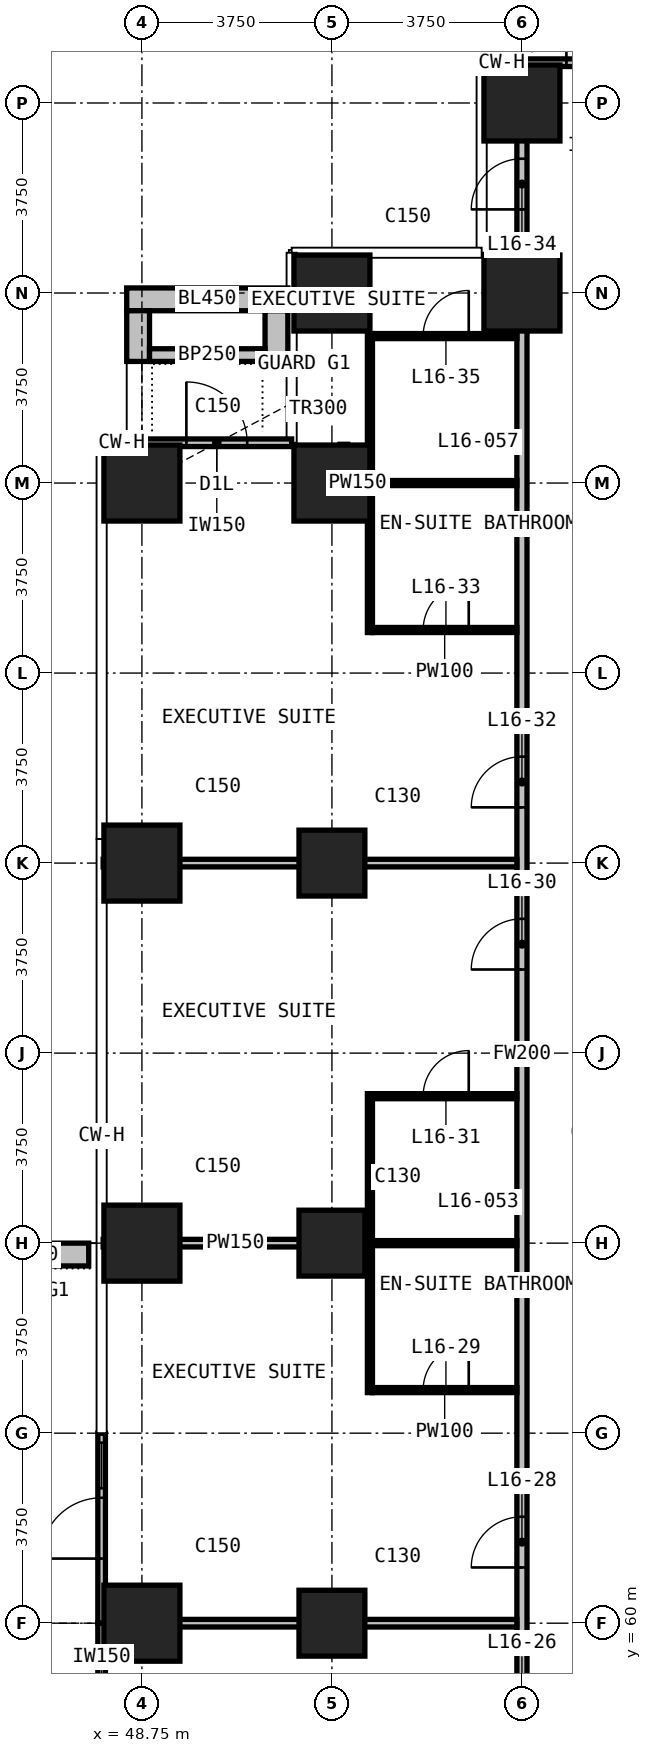
"""IFC4 building model, lengths in metres.
Left out: names, types, materials, properties, quantities, classifications, styles, units other than length and angle.
Written with IfcOpenShell. Run it as: python <this file> out.ifc"""

import sys

from ifc_helpers import new_model, si_unit, direction, frame, frame_2d, origin, origin_2d, place, context, subcontext, project, spatial, rectangle, extrude, element, fill, save


model = new_model("IFC4")
c1 = context("Model", 3, precision=1e-05, world=origin(), true_north=direction((0.0, 1.0)))
c2 = subcontext(c1, "Body", "Model", "MODEL_VIEW")
j1 = project(units=[si_unit("LENGTHUNIT", "METRE"), si_unit("PLANEANGLEUNIT", "RADIAN")], contexts=[c1])
p1 = place(None, origin())
s1 = spatial("IfcSite", under=j1, at=p1, CompositionType="ELEMENT")
p2 = place(p1, origin())
s2 = spatial("IfcBuilding", under=s1, at=p2, CompositionType="ELEMENT")
p3 = place(p2, frame((0.0, 0.0, 72.5)))
s3 = spatial("IfcBuildingStorey", under=s2, at=p3, CompositionType="ELEMENT", Elevation=72.5)
for number, where, z_axis, x_axis in (
    (1, (48.75, 60.0, 0.0), (0.0, 0.0, 1.0), (1.0, 0.0, 0.0)),
    (2, (48.75, 67.5, 0.0), (0.0, 0.0, 1.0), (1.0, 0.0, 0.0)),
    (3, (48.75, 75.0, 0.0), (0.0, 0.0, 1.0), (1.0, 0.0, 0.0)),
    (4, (48.75, 82.5, 0.0), (0.0, 0.0, 1.0), (1.0, 0.0, 0.0)),
):
    element("IfcColumn", number, at=place(p3, frame(where, z_axis=z_axis, x_axis=x_axis)), inside=s3, PredefinedType="COLUMN", context=c2, shape_type="SweptSolid", body=[
        extrude(rectangle(XDim=1.5, YDim=1.5, at=origin_2d()), origin(), (0.0, 0.0, 1.0), 3.3),
    ])
for number, where, z_axis, x_axis in (
    (5, (52.5, 60.0, 0.0), (0.0, 0.0, 1.0), (1.0, 0.0, 0.0)),
    (6, (52.5, 67.5, 0.0), (0.0, 0.0, 1.0), (1.0, 0.0, 0.0)),
    (7, (52.5, 75.0, 0.0), (0.0, 0.0, 1.0), (1.0, 0.0, 0.0)),
):
    element("IfcColumn", number, at=place(p3, frame(where, z_axis=z_axis, x_axis=x_axis)), inside=s3, PredefinedType="COLUMN", context=c2, shape_type="SweptSolid", body=[
        extrude(rectangle(XDim=1.3, YDim=1.3, at=origin_2d()), origin(), (0.0, 0.0, 1.0), 3.3),
    ])
for number, where, z_axis, x_axis in (
    (8, (52.5, 82.5, 0.0), (0.0, 0.0, 1.0), (1.0, 0.0, 0.0)),
    (9, (52.5, 86.25, 0.0), (0.0, 0.0, 1.0), (1.0, 0.0, 0.0)),
    (10, (56.25, 86.25, 0.0), (0.0, 0.0, 1.0), (1.0, 0.0, 0.0)),
    (11, (56.25, 90.0, 0.0), (0.0, 0.0, 1.0), (1.0, 0.0, 0.0)),
):
    element("IfcColumn", number, at=place(p3, frame(where, z_axis=z_axis, x_axis=x_axis)), inside=s3, PredefinedType="COLUMN", context=c2, shape_type="SweptSolid", body=[
        extrude(rectangle(XDim=1.5, YDim=1.5, at=origin_2d()), origin(), (0.0, 0.0, 1.0), 3.3),
    ])
p4 = place(p3, frame((56.25, 90.795, 0.0), z_axis=(0.0, 0.0, 1.0), x_axis=(1.0, 0.0, 0.0)))
e12 = element("IfcWall", 12, at=p4, inside=s3, PredefinedType="SOLIDWALL", context=c2, shape_type="SweptSolid", body=[
    extrude(rectangle(XDim=2.955, YDim=0.15, at=frame_2d((1.478, 0.0))), origin(), (0.0, 0.0, 1.0), 3.0),
])
p5 = place(p4, frame((0.877, 0.0, 0.0)))
e13 = element("IfcOpeningElement", 13, at=p5, cuts=e12, PredefinedType="OPENING", context=c2, shape_type="SweptSolid", body=[
    extrude(rectangle(XDim=1.2, YDim=2.4, at=frame_2d((0.6, 1.2))), frame((0.0, 0.085, 0.0), z_axis=(0.0, -1.0, 0.0), x_axis=(1.0, 0.0, 0.0)), (0.0, 0.0, 1.0), 0.17),
])
p6 = place(p3, frame((48.75, 83.295, 0.0), z_axis=(0.0, 0.0, 1.0), x_axis=(1.0, 0.0, 0.0)))
e14 = element("IfcWall", 14, at=p6, inside=s3, PredefinedType="SOLIDWALL", context=c2, shape_type="SweptSolid", body=[
    extrude(rectangle(XDim=2.955, YDim=0.15, at=frame_2d((1.478, 0.0))), origin(), (0.0, 0.0, 1.0), 3.0),
])
p7 = place(p6, frame((0.877, 0.0, 0.0)))
e15 = element("IfcOpeningElement", 15, at=p7, cuts=e14, PredefinedType="OPENING", context=c2, shape_type="SweptSolid", body=[
    extrude(rectangle(XDim=1.2, YDim=2.0, at=frame_2d((0.6, 1.0))), frame((0.0, 0.085, 0.0), z_axis=(0.0, -1.0, 0.0), x_axis=(1.0, 0.0, 0.0)), (0.0, 0.0, 1.0), 0.17),
])
p8 = place(p3, frame((47.955, 56.25, 0.0), z_axis=(0.0, 0.0, 1.0), x_axis=(0.0, 1.0, 0.0)))
e16 = element("IfcWall", 16, at=p8, inside=s3, PredefinedType="SOLIDWALL", context=c2, shape_type="SweptSolid", body=[
    extrude(rectangle(XDim=3.75, YDim=0.15, at=frame_2d((1.875, 0.0))), origin(), (0.0, 0.0, 1.0), 3.0),
])
p9 = place(p8, frame((0.188, 0.0, 0.1)))
e17 = element("IfcOpeningElement", 17, at=p9, cuts=e16, PredefinedType="OPENING", context=c2, shape_type="SweptSolid", body=[
    extrude(rectangle(XDim=0.9, YDim=2.4, at=frame_2d((0.45, 1.2))), frame((0.0, 0.085, 0.0), z_axis=(0.0, -1.0, 0.0), x_axis=(1.0, 0.0, 0.0)), (0.0, 0.0, 1.0), 0.17),
])
p10 = place(p8, frame((1.275, 0.0, 0.0)))
e18 = element("IfcOpeningElement", 18, at=p10, cuts=e16, PredefinedType="OPENING", context=c2, shape_type="SweptSolid", body=[
    extrude(rectangle(XDim=1.2, YDim=2.4, at=frame_2d((0.6, 1.2))), frame((0.0, 0.085, 0.0), z_axis=(0.0, -1.0, 0.0), x_axis=(1.0, 0.0, 0.0)), (0.0, 0.0, 1.0), 0.17),
])
p11 = place(p3, frame((47.955, 60.0, 0.0), z_axis=(0.0, 0.0, 1.0), x_axis=(0.0, 1.0, 0.0)))
e19 = element("IfcWall", 19, at=p11, inside=s3, PredefinedType="SOLIDWALL", context=c2, shape_type="SweptSolid", body=[
    extrude(rectangle(XDim=3.75, YDim=0.15, at=frame_2d((1.875, 0.0))), origin(), (0.0, 0.0, 1.0), 3.0),
])
p12 = place(p11, frame((1.275, 0.0, 0.0)))
e20 = element("IfcOpeningElement", 20, at=p12, cuts=e19, PredefinedType="OPENING", context=c2, shape_type="SweptSolid", body=[
    extrude(rectangle(XDim=1.2, YDim=2.4, at=frame_2d((0.6, 1.2))), frame((0.0, 0.085, 0.0), z_axis=(0.0, -1.0, 0.0), x_axis=(1.0, 0.0, 0.0)), (0.0, 0.0, 1.0), 0.17),
])
p13 = place(p11, frame((2.663, 0.0, 0.1)))
e21 = element("IfcOpeningElement", 21, at=p13, cuts=e19, PredefinedType="OPENING", context=c2, shape_type="SweptSolid", body=[
    extrude(rectangle(XDim=0.9, YDim=2.4, at=frame_2d((0.45, 1.2))), frame((0.0, 0.085, 0.0), z_axis=(0.0, -1.0, 0.0), x_axis=(1.0, 0.0, 0.0)), (0.0, 0.0, 1.0), 0.17),
])
p14 = place(p3, frame((48.45, 86.125, 0.0), z_axis=(0.0, 0.0, 1.0), x_axis=(1.0, 0.0, 0.0)))
e22 = element("IfcWall", 22, at=p14, inside=s3, PredefinedType="USERDEFINED", context=c2, shape_type="SweptSolid", body=[
    extrude(rectangle(XDim=3.18, YDim=0.45, at=frame_2d((1.59, 0.0))), origin(), (0.0, 0.0, 1.0), 1.1),
])
for number, where, z_axis, x_axis in (
    (23, (48.675, 84.9, 0.0), (0.0, 0.0, 1.0), (0.0, 1.0, 0.0)),
    (24, (51.405, 84.9, 0.0), (0.0, 0.0, 1.0), (0.0, 1.0, 0.0)),
):
    element("IfcWall", number, at=place(p3, frame(where, z_axis=z_axis, x_axis=x_axis)), inside=s3, PredefinedType="USERDEFINED", context=c2, shape_type="SweptSolid", body=[
        extrude(rectangle(XDim=1.0, YDim=0.45, at=frame_2d((0.5, 0.0))), origin(), (0.0, 0.0, 1.0), 1.1),
    ])
p15 = place(p3, frame((48.9, 85.025, 0.0), z_axis=(0.0, 0.0, 1.0), x_axis=(1.0, 0.0, 0.0)))
e25 = element("IfcWall", 25, at=p15, inside=s3, PredefinedType="USERDEFINED", context=c2, shape_type="SweptSolid", body=[
    extrude(rectangle(XDim=2.28, YDim=0.25, at=frame_2d((1.14, 0.0))), origin(), (0.0, 0.0, 1.0), 1.0),
])
p16 = place(p3, frame((47.7, 67.275, 0.0), z_axis=(0.0, 0.0, 1.0), x_axis=(-1.0, 0.0, 0.0)))
e26 = element("IfcWall", 26, at=p16, inside=s3, PredefinedType="USERDEFINED", context=c2, shape_type="SweptSolid", body=[
    extrude(rectangle(XDim=2.35, YDim=0.45, at=frame_2d((1.175, 0.0))), origin(), (0.0, 0.0, 1.0), 1.1),
])
p17 = place(p3, frame((56.25, 52.4, 0.0), z_axis=(0.0, 0.0, 1.0), x_axis=(0.0, 1.0, 0.0)))
e27 = element("IfcWall", 27, at=p17, inside=s3, PredefinedType="PARTITIONING", context=c2, shape_type="SweptSolid", body=[
    extrude(rectangle(XDim=37.675, YDim=0.2, at=frame_2d((18.837, 0.0))), origin(), (0.0, 0.0, 1.0), 3.0),
])
p18 = place(p17, frame((5.5, 0.0, 0.0)))
e28 = element("IfcOpeningElement", 28, at=p18, cuts=e27, PredefinedType="OPENING", context=c2, shape_type="SweptSolid", body=[
    extrude(rectangle(XDim=1.0, YDim=2.2, at=frame_2d((0.5, 1.1))), frame((0.0, 0.11, 0.0), z_axis=(0.0, -1.0, 0.0), x_axis=(1.0, 0.0, 0.0)), (0.0, 0.0, 1.0), 0.22),
])
p19 = place(p17, frame((8.7, 0.0, 0.0)))
e29 = element("IfcOpeningElement", 29, at=p19, cuts=e27, PredefinedType="OPENING", context=c2, shape_type="SweptSolid", body=[
    extrude(rectangle(XDim=1.0, YDim=2.2, at=frame_2d((0.5, 1.1))), frame((0.0, 0.11, 0.0), z_axis=(0.0, -1.0, 0.0), x_axis=(1.0, 0.0, 0.0)), (0.0, 0.0, 1.0), 0.22),
])
p20 = place(p17, frame((20.5, 0.0, 0.0)))
e30 = element("IfcOpeningElement", 30, at=p20, cuts=e27, PredefinedType="OPENING", context=c2, shape_type="SweptSolid", body=[
    extrude(rectangle(XDim=1.0, YDim=2.2, at=frame_2d((0.5, 1.1))), frame((0.0, 0.11, 0.0), z_axis=(0.0, -1.0, 0.0), x_axis=(1.0, 0.0, 0.0)), (0.0, 0.0, 1.0), 0.22),
])
p21 = place(p17, frame((23.7, 0.0, 0.0)))
e31 = element("IfcOpeningElement", 31, at=p21, cuts=e27, PredefinedType="OPENING", context=c2, shape_type="SweptSolid", body=[
    extrude(rectangle(XDim=1.0, YDim=2.2, at=frame_2d((0.5, 1.1))), frame((0.0, 0.11, 0.0), z_axis=(0.0, -1.0, 0.0), x_axis=(1.0, 0.0, 0.0)), (0.0, 0.0, 1.0), 0.22),
])
p22 = place(p17, frame((35.5, 0.0, 0.0)))
e32 = element("IfcOpeningElement", 32, at=p22, cuts=e27, PredefinedType="OPENING", context=c2, shape_type="SweptSolid", body=[
    extrude(rectangle(XDim=1.0, YDim=2.2, at=frame_2d((0.5, 1.1))), frame((0.0, 0.11, 0.0), z_axis=(0.0, -1.0, 0.0), x_axis=(1.0, 0.0, 0.0)), (0.0, 0.0, 1.0), 0.22),
])
p23 = place(p3, frame((56.25, 90.03, 0.0), z_axis=(0.0, 0.0, 1.0), x_axis=(0.0, 1.0, 0.0)))
e33 = element("IfcWall", 33, at=p23, inside=s3, PredefinedType="PARTITIONING", context=c2, shape_type="SweptSolid", body=[
    extrude(rectangle(XDim=0.615, YDim=0.2, at=frame_2d((0.308, 0.0))), origin(), (0.0, 0.0, 1.0), 3.0),
])
p24 = place(p3, frame((48.04, 60.0, 0.0), z_axis=(0.0, 0.0, 1.0), x_axis=(1.0, 0.0, 0.0)))
e34 = element("IfcWall", 34, at=p24, inside=s3, PredefinedType="PARTITIONING", context=c2, shape_type="SweptSolid", body=[
    extrude(rectangle(XDim=8.11, YDim=0.15, at=frame_2d((4.055, 0.0))), origin(), (0.0, 0.0, 1.0), 3.0),
])
p25 = place(p3, frame((47.985, 67.5, 0.0), z_axis=(0.0, 0.0, 1.0), x_axis=(1.0, 0.0, 0.0)))
e35 = element("IfcWall", 35, at=p25, inside=s3, PredefinedType="PARTITIONING", context=c2, shape_type="SweptSolid", body=[
    extrude(rectangle(XDim=5.215, YDim=0.15, at=frame_2d((2.607, 0.0))), origin(), (0.0, 0.0, 1.0), 3.0),
])
p26 = place(p3, frame((47.985, 75.0, 0.0), z_axis=(0.0, 0.0, 1.0), x_axis=(1.0, 0.0, 0.0)))
e36 = element("IfcWall", 36, at=p26, inside=s3, PredefinedType="PARTITIONING", context=c2, shape_type="SweptSolid", body=[
    extrude(rectangle(XDim=8.165, YDim=0.15, at=frame_2d((4.083, 0.0))), origin(), (0.0, 0.0, 1.0), 3.0),
])
p27 = place(p3, frame((52.81, 82.5, 0.0), z_axis=(0.0, 0.0, 1.0), x_axis=(1.0, 0.0, 0.0)))
e37 = element("IfcWall", 37, at=p27, inside=s3, PredefinedType="PARTITIONING", context=c2, shape_type="SweptSolid", body=[
    extrude(rectangle(XDim=0.39, YDim=0.15, at=frame_2d((0.195, 0.0))), origin(), (0.0, 0.0, 1.0), 3.0),
])
p28 = place(p3, frame((55.605, 90.0, 0.0), z_axis=(0.0, 0.0, 1.0), x_axis=(1.0, 0.0, 0.0)))
e38 = element("IfcWall", 38, at=p28, inside=s3, PredefinedType="PARTITIONING", context=c2, shape_type="SweptSolid", body=[
    extrude(rectangle(XDim=0.545, YDim=0.15, at=frame_2d((0.272, 0.0))), origin(), (0.0, 0.0, 1.0), 3.0),
])
p29 = place(p3, frame((52.735, 82.425, 0.0), z_axis=(0.0, 0.0, 1.0), x_axis=(0.0, 1.0, 0.0)))
e39 = element("IfcWall", 39, at=p29, inside=s3, PredefinedType="PARTITIONING", context=c2, shape_type="SweptSolid", body=[
    extrude(rectangle(XDim=0.84, YDim=0.15, at=frame_2d((0.42, 0.0))), origin(), (0.0, 0.0, 1.0), 3.0),
])
p30 = place(p3, frame((53.3, 64.6, 0.0), z_axis=(0.0, 0.0, 1.0), x_axis=(1.0, 0.0, 0.0)))
e40 = element("IfcWall", 40, at=p30, inside=s3, PredefinedType="PARTITIONING", context=c2, shape_type="SweptSolid", body=[
    extrude(rectangle(XDim=2.85, YDim=0.1, at=frame_2d((1.425, 0.0))), origin(), (0.0, 0.0, 1.0), 3.0),
])
p31 = place(p30, frame((1.0, 0.0, 0.0)))
e41 = element("IfcOpeningElement", 41, at=p31, cuts=e40, PredefinedType="OPENING", context=c2, shape_type="SweptSolid", body=[
    extrude(rectangle(XDim=0.9, YDim=2.2, at=frame_2d((0.45, 1.1))), frame((0.0, 0.06, 0.0), z_axis=(0.0, -1.0, 0.0), x_axis=(1.0, 0.0, 0.0)), (0.0, 0.0, 1.0), 0.12),
])
p32 = place(p3, frame((53.3, 67.5, 0.0), z_axis=(0.0, 0.0, 1.0), x_axis=(1.0, 0.0, 0.0)))
e42 = element("IfcWall", 42, at=p32, inside=s3, PredefinedType="PARTITIONING", context=c2, shape_type="SweptSolid", body=[
    extrude(rectangle(XDim=2.85, YDim=0.1, at=frame_2d((1.425, 0.0))), origin(), (0.0, 0.0, 1.0), 3.0),
])
p33 = place(p3, frame((53.3, 70.4, 0.0), z_axis=(0.0, 0.0, 1.0), x_axis=(1.0, 0.0, 0.0)))
e43 = element("IfcWall", 43, at=p33, inside=s3, PredefinedType="PARTITIONING", context=c2, shape_type="SweptSolid", body=[
    extrude(rectangle(XDim=2.85, YDim=0.1, at=frame_2d((1.425, 0.0))), origin(), (0.0, 0.0, 1.0), 3.0),
])
p34 = place(p33, frame((1.0, 0.0, 0.0)))
e44 = element("IfcOpeningElement", 44, at=p34, cuts=e43, PredefinedType="OPENING", context=c2, shape_type="SweptSolid", body=[
    extrude(rectangle(XDim=0.9, YDim=2.2, at=frame_2d((0.45, 1.1))), frame((0.0, 0.06, 0.0), z_axis=(0.0, -1.0, 0.0), x_axis=(1.0, 0.0, 0.0)), (0.0, 0.0, 1.0), 0.12),
])
p35 = place(p3, frame((53.3, 79.6, 0.0), z_axis=(0.0, 0.0, 1.0), x_axis=(1.0, 0.0, 0.0)))
e45 = element("IfcWall", 45, at=p35, inside=s3, PredefinedType="PARTITIONING", context=c2, shape_type="SweptSolid", body=[
    extrude(rectangle(XDim=2.85, YDim=0.1, at=frame_2d((1.425, 0.0))), origin(), (0.0, 0.0, 1.0), 3.0),
])
p36 = place(p35, frame((1.0, 0.0, 0.0)))
e46 = element("IfcOpeningElement", 46, at=p36, cuts=e45, PredefinedType="OPENING", context=c2, shape_type="SweptSolid", body=[
    extrude(rectangle(XDim=0.9, YDim=2.2, at=frame_2d((0.45, 1.1))), frame((0.0, 0.06, 0.0), z_axis=(0.0, -1.0, 0.0), x_axis=(1.0, 0.0, 0.0)), (0.0, 0.0, 1.0), 0.12),
])
p37 = place(p3, frame((53.3, 82.5, 0.0), z_axis=(0.0, 0.0, 1.0), x_axis=(1.0, 0.0, 0.0)))
e47 = element("IfcWall", 47, at=p37, inside=s3, PredefinedType="PARTITIONING", context=c2, shape_type="SweptSolid", body=[
    extrude(rectangle(XDim=2.85, YDim=0.1, at=frame_2d((1.425, 0.0))), origin(), (0.0, 0.0, 1.0), 3.0),
])
p38 = place(p3, frame((53.3, 85.4, 0.0), z_axis=(0.0, 0.0, 1.0), x_axis=(1.0, 0.0, 0.0)))
e48 = element("IfcWall", 48, at=p38, inside=s3, PredefinedType="PARTITIONING", context=c2, shape_type="SweptSolid", body=[
    extrude(rectangle(XDim=2.85, YDim=0.1, at=frame_2d((1.425, 0.0))), origin(), (0.0, 0.0, 1.0), 3.0),
])
p39 = place(p38, frame((1.0, 0.0, 0.0)))
e49 = element("IfcOpeningElement", 49, at=p39, cuts=e48, PredefinedType="OPENING", context=c2, shape_type="SweptSolid", body=[
    extrude(rectangle(XDim=0.9, YDim=2.2, at=frame_2d((0.45, 1.1))), frame((0.0, 0.06, 0.0), z_axis=(0.0, -1.0, 0.0), x_axis=(1.0, 0.0, 0.0)), (0.0, 0.0, 1.0), 0.12),
])
for number, where, z_axis, x_axis in (
    (50, (53.25, 64.55, 0.0), (0.0, 0.0, 1.0), (0.0, 1.0, 0.0)),
    (51, (53.25, 79.55, 0.0), (0.0, 0.0, 1.0), (0.0, 1.0, 0.0)),
):
    element("IfcWall", number, at=place(p3, frame(where, z_axis=z_axis, x_axis=x_axis)), inside=s3, PredefinedType="PARTITIONING", context=c2, shape_type="SweptSolid", body=[
        extrude(rectangle(XDim=5.9, YDim=0.1, at=frame_2d((2.95, 0.0))), origin(), (0.0, 0.0, 1.0), 3.0),
    ])
p40 = place(p5, origin())
e52 = element("IfcDoor", 52, at=p40, inside=s3, OperationType="SINGLE_SWING_LEFT", PredefinedType="DOOR", context=c2, shape_type="SweptSolid", body=[
    extrude(rectangle(XDim=1.2, YDim=2.4, at=frame_2d((0.6, 1.2))), frame((0.0, 0.025, 0.0), z_axis=(0.0, -1.0, 0.0), x_axis=(1.0, 0.0, 0.0)), (0.0, 0.0, 1.0), 0.05),
])
fill(e13, e52)
p41 = place(p7, origin())
e53 = element("IfcDoor", 53, at=p41, inside=s3, OperationType="SINGLE_SWING_LEFT", PredefinedType="DOOR", context=c2, shape_type="SweptSolid", body=[
    extrude(rectangle(XDim=1.2, YDim=2.0, at=frame_2d((0.6, 1.0))), frame((0.0, 0.025, 0.0), z_axis=(0.0, -1.0, 0.0), x_axis=(1.0, 0.0, 0.0)), (0.0, 0.0, 1.0), 0.05),
])
fill(e15, e53)
p42 = place(p12, origin())
e54 = element("IfcDoor", 54, at=p42, inside=s3, OperationType="SINGLE_SWING_LEFT", PredefinedType="DOOR", context=c2, shape_type="SweptSolid", body=[
    extrude(rectangle(XDim=1.2, YDim=2.4, at=frame_2d((0.6, 1.2))), frame((0.0, 0.025, 0.0), z_axis=(0.0, -1.0, 0.0), x_axis=(1.0, 0.0, 0.0)), (0.0, 0.0, 1.0), 0.05),
])
fill(e20, e54)
p43 = place(p13, origin())
e55 = element("IfcWindow", 55, at=p43, inside=s3, PartitioningType="SINGLE_PANEL", PredefinedType="WINDOW", context=c2, shape_type="SweptSolid", body=[
    extrude(rectangle(XDim=0.9, YDim=2.4, at=frame_2d((0.45, 1.2))), frame((0.0, 0.03, 0.0), z_axis=(0.0, -1.0, 0.0), x_axis=(1.0, 0.0, 0.0)), (0.0, 0.0, 1.0), 0.06),
])
fill(e21, e55)
p44 = place(p19, origin())
e56 = element("IfcDoor", 56, at=p44, inside=s3, OperationType="SINGLE_SWING_RIGHT", PredefinedType="DOOR", context=c2, shape_type="SweptSolid", body=[
    extrude(rectangle(XDim=1.0, YDim=2.2, at=frame_2d((0.5, 1.1))), frame((0.0, 0.025, 0.0), z_axis=(0.0, -1.0, 0.0), x_axis=(1.0, 0.0, 0.0)), (0.0, 0.0, 1.0), 0.05),
])
fill(e29, e56)
p45 = place(p31, origin())
e57 = element("IfcDoor", 57, at=p45, inside=s3, OperationType="SINGLE_SWING_RIGHT", PredefinedType="DOOR", context=c2, shape_type="SweptSolid", body=[
    extrude(rectangle(XDim=0.9, YDim=2.2, at=frame_2d((0.45, 1.1))), frame((0.0, 0.025, 0.0), z_axis=(0.0, -1.0, 0.0), x_axis=(1.0, 0.0, 0.0)), (0.0, 0.0, 1.0), 0.05),
])
fill(e41, e57)
p46 = place(p20, origin())
e58 = element("IfcDoor", 58, at=p46, inside=s3, OperationType="SINGLE_SWING_LEFT", PredefinedType="DOOR", context=c2, shape_type="SweptSolid", body=[
    extrude(rectangle(XDim=1.0, YDim=2.2, at=frame_2d((0.5, 1.1))), frame((0.0, 0.025, 0.0), z_axis=(0.0, -1.0, 0.0), x_axis=(1.0, 0.0, 0.0)), (0.0, 0.0, 1.0), 0.05),
])
fill(e30, e58)
p47 = place(p34, origin())
e59 = element("IfcDoor", 59, at=p47, inside=s3, OperationType="SINGLE_SWING_RIGHT", PredefinedType="DOOR", context=c2, shape_type="SweptSolid", body=[
    extrude(rectangle(XDim=0.9, YDim=2.2, at=frame_2d((0.45, 1.1))), frame((0.0, 0.025, 0.0), z_axis=(0.0, -1.0, 0.0), x_axis=(1.0, 0.0, 0.0)), (0.0, 0.0, 1.0), 0.05),
])
fill(e44, e59)
p48 = place(p21, origin())
e60 = element("IfcDoor", 60, at=p48, inside=s3, OperationType="SINGLE_SWING_LEFT", PredefinedType="DOOR", context=c2, shape_type="SweptSolid", body=[
    extrude(rectangle(XDim=1.0, YDim=2.2, at=frame_2d((0.5, 1.1))), frame((0.0, 0.025, 0.0), z_axis=(0.0, -1.0, 0.0), x_axis=(1.0, 0.0, 0.0)), (0.0, 0.0, 1.0), 0.05),
])
fill(e31, e60)
p49 = place(p36, origin())
e61 = element("IfcDoor", 61, at=p49, inside=s3, OperationType="SINGLE_SWING_RIGHT", PredefinedType="DOOR", context=c2, shape_type="SweptSolid", body=[
    extrude(rectangle(XDim=0.9, YDim=2.2, at=frame_2d((0.45, 1.1))), frame((0.0, 0.025, 0.0), z_axis=(0.0, -1.0, 0.0), x_axis=(1.0, 0.0, 0.0)), (0.0, 0.0, 1.0), 0.05),
])
fill(e46, e61)
p50 = place(p22, origin())
e62 = element("IfcDoor", 62, at=p50, inside=s3, OperationType="SINGLE_SWING_LEFT", PredefinedType="DOOR", context=c2, shape_type="SweptSolid", body=[
    extrude(rectangle(XDim=1.0, YDim=2.2, at=frame_2d((0.5, 1.1))), frame((0.0, 0.025, 0.0), z_axis=(0.0, -1.0, 0.0), x_axis=(1.0, 0.0, 0.0)), (0.0, 0.0, 1.0), 0.05),
])
fill(e32, e62)
p51 = place(p39, origin())
e63 = element("IfcDoor", 63, at=p51, inside=s3, OperationType="SINGLE_SWING_RIGHT", PredefinedType="DOOR", context=c2, shape_type="SweptSolid", body=[
    extrude(rectangle(XDim=0.9, YDim=2.2, at=frame_2d((0.45, 1.1))), frame((0.0, 0.025, 0.0), z_axis=(0.0, -1.0, 0.0), x_axis=(1.0, 0.0, 0.0)), (0.0, 0.0, 1.0), 0.05),
])
fill(e49, e63)
save(model, sys.argv[1])
